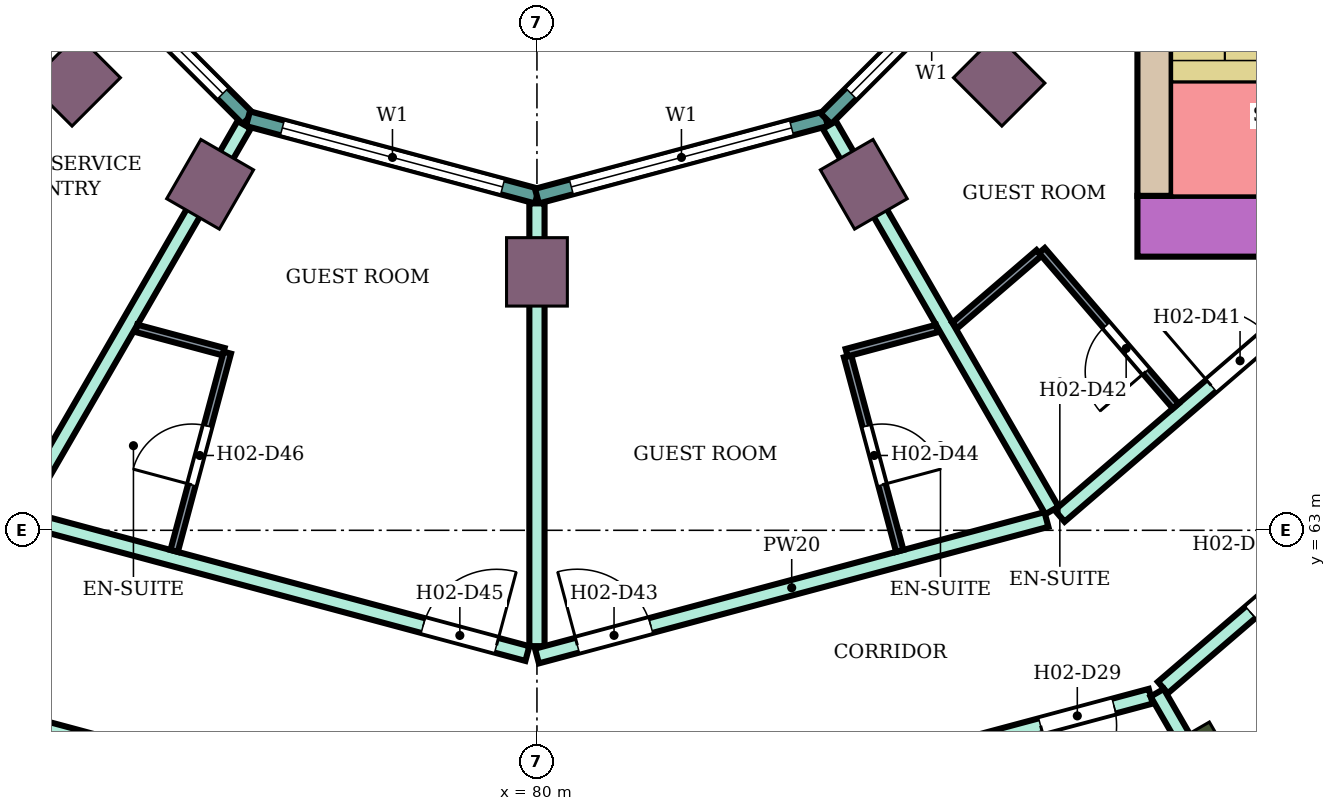
"""IFC4 building model, lengths in metres.
Left out: names, types, materials, properties, quantities, classifications, styles, units other than length and angle.
Written with IfcOpenShell. Run it as: python <this file> out.ifc"""

import sys

from ifc_helpers import new_model, si_unit, direction, frame, frame_2d, origin, origin_2d, place, context, subcontext, project, spatial, rectangle, extrude, element, fill, save


model = new_model("IFC4")
c1 = context("Model", 3, precision=1e-05, world=origin(), true_north=direction((0.0, 1.0)))
c2 = subcontext(c1, "Body", "Model", "MODEL_VIEW")
j1 = project(units=[si_unit("LENGTHUNIT", "METRE"), si_unit("PLANEANGLEUNIT", "RADIAN")], contexts=[c1])
p1 = place(None, origin())
s1 = spatial("IfcSite", under=j1, at=p1, CompositionType="ELEMENT")
p2 = place(p1, origin())
s2 = spatial("IfcBuilding", under=s1, at=p2, CompositionType="ELEMENT")
p3 = place(p2, frame((0.0, 0.0, 44.0)))
s3 = spatial("IfcBuildingStorey", under=s2, at=p3, CompositionType="ELEMENT", Elevation=44.0)
p4 = place(p3, frame((88.8, 59.758, 0.0), z_axis=(0.0, 0.0, 1.0), x_axis=(0.5, -0.866025403784, 0.0)))
e1 = element("IfcColumn", 1, at=p4, inside=s3, PredefinedType="COLUMN", context=c2, shape_type="SweptSolid", body=[
    extrude(rectangle(XDim=1.2, YDim=0.8, at=origin_2d()), origin(), (0.0, 0.0, 1.0), 3.8),
])
for number, where, z_axis, x_axis in (
    (2, (73.919, 68.919, 0.0), (0.0, 0.0, 1.0), (-0.707, -0.707, 0.0)),
    (3, (75.7, 67.552, 0.0), (0.0, 0.0, 1.0), (-0.5, -0.866, 0.0)),
    (4, (80.0, 66.4, 0.0), (0.0, 0.0, 1.0), (0.0, -1.0, 0.0)),
    (5, (84.3, 67.552, 0.0), (0.0, 0.0, 1.0), (0.5, -0.866, 0.0)),
    (6, (86.081, 68.919, 0.0), (0.0, 0.0, 1.0), (0.707, -0.707, 0.0)),
):
    element("IfcColumn", number, at=place(p3, frame(where, z_axis=z_axis, x_axis=x_axis)), inside=s3, PredefinedType="COLUMN", context=c2, shape_type="SweptSolid", body=[
        extrude(rectangle(XDim=0.9, YDim=0.8, at=origin_2d()), origin(), (0.0, 0.0, 1.0), 3.8),
    ])
p5 = place(p3, frame((87.9, 67.0, 0.0), z_axis=(0.0, 0.0, 1.0), x_axis=(1.0, 0.0, 0.0)))
e7 = element("IfcWall", 7, at=p5, inside=s3, PredefinedType="SHEAR", context=c2, shape_type="SweptSolid", body=[
    extrude(rectangle(XDim=14.7, YDim=0.8, at=frame_2d((7.35, 0.0))), origin(), (0.0, 0.0, 1.0), 3.48),
])
p6 = place(p5, frame((4.2, 0.0, 0.0)))
e8 = element("IfcOpeningElement", 8, at=p6, cuts=e7, PredefinedType="OPENING", context=c2, shape_type="SweptSolid", body=[
    extrude(rectangle(XDim=2.4, YDim=2.4, at=frame_2d((1.2, 1.2))), frame((0.0, 0.41, 0.0), z_axis=(0.0, -1.0, 0.0), x_axis=(1.0, 0.0, 0.0)), (0.0, 0.0, 1.0), 0.82),
])
p7 = place(p3, frame((88.125, 67.4, 0.0), z_axis=(0.0, 0.0, 1.0), x_axis=(0.0, 1.0, 0.0)))
e9 = element("IfcWall", 9, at=p7, inside=s3, PredefinedType="SHEAR", context=c2, shape_type="SweptSolid", body=[
    extrude(rectangle(XDim=7.6, YDim=0.45, at=frame_2d((3.8, 0.0))), origin(), (0.0, 0.0, 1.0), 3.48),
])
p8 = place(p3, frame((73.415, 71.198, 0.0), z_axis=(0.0, 0.0, 1.0), x_axis=(0.707106781187, -0.707106781187, 0.0)))
e10 = element("IfcWall", 10, at=p8, inside=s3, PredefinedType="NOTDEFINED", context=c2, shape_type="SweptSolid", body=[
    extrude(rectangle(XDim=3.936, YDim=0.2, at=frame_2d((1.968, 0.0))), origin(), (0.0, 0.0, 1.0), 3.8),
])
p9 = place(p8, frame((0.468, 0.0, 0.9)))
e11 = element("IfcOpeningElement", 11, at=p9, cuts=e10, PredefinedType="OPENING", context=c2, shape_type="SweptSolid", body=[
    extrude(rectangle(XDim=3.0, YDim=2.3, at=frame_2d((1.5, 1.15))), frame((0.0, 0.11, 0.0), z_axis=(0.0, -1.0, 0.0), x_axis=(1.0, 0.0, 0.0)), (0.0, 0.0, 1.0), 0.22),
])
p10 = place(p3, frame((76.198, 68.415, 0.0), z_axis=(0.0, 0.0, 1.0), x_axis=(0.965933654434, -0.258789828301, 0.0)))
e12 = element("IfcWall", 12, at=p10, inside=s3, PredefinedType="NOTDEFINED", context=c2, shape_type="SweptSolid", body=[
    extrude(rectangle(XDim=3.936, YDim=0.2, at=frame_2d((1.968, 0.0))), origin(), (0.0, 0.0, 1.0), 3.8),
])
p11 = place(p10, frame((0.468, 0.0, 0.9)))
e13 = element("IfcOpeningElement", 13, at=p11, cuts=e12, PredefinedType="OPENING", context=c2, shape_type="SweptSolid", body=[
    extrude(rectangle(XDim=3.0, YDim=2.3, at=frame_2d((1.5, 1.15))), frame((0.0, 0.11, 0.0), z_axis=(0.0, -1.0, 0.0), x_axis=(1.0, 0.0, 0.0)), (0.0, 0.0, 1.0), 0.22),
])
p12 = place(p3, frame((80.0, 67.396, 0.0), z_axis=(0.0, 0.0, 1.0), x_axis=(0.965933654434, 0.258789828301, 0.0)))
e14 = element("IfcWall", 14, at=p12, inside=s3, PredefinedType="NOTDEFINED", context=c2, shape_type="SweptSolid", body=[
    extrude(rectangle(XDim=3.936, YDim=0.2, at=frame_2d((1.968, 0.0))), origin(), (0.0, 0.0, 1.0), 3.8),
])
p13 = place(p12, frame((0.468, 0.0, 0.9)))
e15 = element("IfcOpeningElement", 15, at=p13, cuts=e14, PredefinedType="OPENING", context=c2, shape_type="SweptSolid", body=[
    extrude(rectangle(XDim=3.0, YDim=2.3, at=frame_2d((1.5, 1.15))), frame((0.0, 0.11, 0.0), z_axis=(0.0, -1.0, 0.0), x_axis=(1.0, 0.0, 0.0)), (0.0, 0.0, 1.0), 0.22),
])
p14 = place(p3, frame((83.802, 68.415, 0.0), z_axis=(0.0, 0.0, 1.0), x_axis=(0.707106781187, 0.707106781187, 0.0)))
e16 = element("IfcWall", 16, at=p14, inside=s3, PredefinedType="NOTDEFINED", context=c2, shape_type="SweptSolid", body=[
    extrude(rectangle(XDim=3.936, YDim=0.2, at=frame_2d((1.968, 0.0))), origin(), (0.0, 0.0, 1.0), 3.8),
])
p15 = place(p14, frame((0.468, 0.0, 0.9)))
e17 = element("IfcOpeningElement", 17, at=p15, cuts=e16, PredefinedType="OPENING", context=c2, shape_type="SweptSolid", body=[
    extrude(rectangle(XDim=3.0, YDim=2.3, at=frame_2d((1.5, 1.15))), frame((0.0, 0.11, 0.0), z_axis=(0.0, -1.0, 0.0), x_axis=(1.0, 0.0, 0.0)), (0.0, 0.0, 1.0), 0.22),
])
p16 = place(p3, frame((71.877, 60.832, 0.0), z_axis=(0.0, 0.0, 1.0), x_axis=(0.965852509869, -0.259092510851, 0.0)))
e18 = element("IfcWall", 18, at=p16, inside=s3, PredefinedType="PARTITIONING", context=c2, shape_type="SweptSolid", body=[
    extrude(rectangle(XDim=8.32, YDim=0.2, at=frame_2d((4.16, 0.0))), origin(), (0.0, 0.0, 1.0), 3.35),
])
p17 = place(p16, frame((6.86, 0.0, 0.0)))
e19 = element("IfcOpeningElement", 19, at=p17, cuts=e18, PredefinedType="OPENING", context=c2, shape_type="SweptSolid", body=[
    extrude(rectangle(XDim=1.0, YDim=2.1, at=frame_2d((0.5, 1.05))), frame((0.0, 0.11, 0.0), z_axis=(0.0, -1.0, 0.0), x_axis=(1.0, 0.0, 0.0)), (0.0, 0.0, 1.0), 0.22),
])
p18 = place(p16, frame((0.55, 0.0, 0.0)))
e20 = element("IfcOpeningElement", 20, at=p18, cuts=e18, PredefinedType="OPENING", context=c2, shape_type="SweptSolid", body=[
    extrude(rectangle(XDim=1.0, YDim=2.1, at=frame_2d((0.5, 1.05))), frame((0.0, 0.11, 0.0), z_axis=(0.0, -1.0, 0.0), x_axis=(1.0, 0.0, 0.0)), (0.0, 0.0, 1.0), 0.22),
])
p19 = place(p3, frame((73.287, 63.145, 0.0), z_axis=(0.0, 0.0, 1.0), x_axis=(0.965854200194, -0.259086209526, 0.0)))
e21 = element("IfcWall", 21, at=p19, inside=s3, PredefinedType="PARTITIONING", context=c2, shape_type="SweptSolid", body=[
    extrude(rectangle(XDim=6.82, YDim=0.2, at=frame_2d((3.41, 0.0))), origin(), (0.0, 0.0, 1.0), 3.35),
])
p20 = place(p19, frame((5.4, 0.0, 0.0)))
e22 = element("IfcOpeningElement", 22, at=p20, cuts=e21, PredefinedType="OPENING", context=c2, shape_type="SweptSolid", body=[
    extrude(rectangle(XDim=1.0, YDim=2.1, at=frame_2d((0.5, 1.05))), frame((0.0, 0.11, 0.0), z_axis=(0.0, -1.0, 0.0), x_axis=(1.0, 0.0, 0.0)), (0.0, 0.0, 1.0), 0.22),
])
p21 = place(p3, frame((73.169, 63.178, 0.0), z_axis=(0.0, 0.0, 1.0), x_axis=(0.50020860964, 0.865904929448, 0.0)))
e23 = element("IfcWall", 23, at=p21, inside=s3, PredefinedType="PARTITIONING", context=c2, shape_type="SweptSolid", body=[
    extrude(rectangle(XDim=5.955, YDim=0.2, at=frame_2d((2.978, 0.0))), origin(), (0.0, 0.0, 1.0), 3.35),
])
p22 = place(p3, frame((80.0, 58.655, 0.0), z_axis=(0.0, 0.0, 1.0), x_axis=(0.965967338894, 0.258664068224, 0.0)))
e24 = element("IfcWall", 24, at=p22, inside=s3, PredefinedType="PARTITIONING", context=c2, shape_type="SweptSolid", body=[
    extrude(rectangle(XDim=8.36, YDim=0.2, at=frame_2d((4.18, 0.0))), origin(), (0.0, 0.0, 1.0), 3.35),
])
p23 = place(p22, frame((6.86, 0.0, 0.0)))
e25 = element("IfcOpeningElement", 25, at=p23, cuts=e24, PredefinedType="OPENING", context=c2, shape_type="SweptSolid", body=[
    extrude(rectangle(XDim=1.0, YDim=2.1, at=frame_2d((0.5, 1.05))), frame((0.0, 0.11, 0.0), z_axis=(0.0, -1.0, 0.0), x_axis=(1.0, 0.0, 0.0)), (0.0, 0.0, 1.0), 0.22),
])
p24 = place(p22, frame((1.675, 0.0, 0.0)))
e26 = element("IfcOpeningElement", 26, at=p24, cuts=e24, PredefinedType="OPENING", context=c2, shape_type="SweptSolid", body=[
    extrude(rectangle(XDim=0.9, YDim=2.1, at=frame_2d((0.45, 1.05))), frame((0.0, 0.11, 0.0), z_axis=(0.0, -1.0, 0.0), x_axis=(1.0, 0.0, 0.0)), (0.0, 0.0, 1.0), 0.22),
])
p25 = place(p3, frame((80.0, 61.476, 0.0), z_axis=(0.0, 0.0, 1.0), x_axis=(0.0, 1.0, 0.0)))
e27 = element("IfcWall", 27, at=p25, inside=s3, PredefinedType="PARTITIONING", context=c2, shape_type="SweptSolid", body=[
    extrude(rectangle(XDim=5.825, YDim=0.2, at=frame_2d((2.913, 0.0))), origin(), (0.0, 0.0, 1.0), 3.35),
])
p26 = place(p3, frame((80.0, 61.346, 0.0), z_axis=(0.0, 0.0, 1.0), x_axis=(0.965924181808, 0.258825182312, 0.0)))
e28 = element("IfcWall", 28, at=p26, inside=s3, PredefinedType="PARTITIONING", context=c2, shape_type="SweptSolid", body=[
    extrude(rectangle(XDim=6.94, YDim=0.2, at=frame_2d((3.47, 0.0))), origin(), (0.0, 0.0, 1.0), 3.35),
])
p27 = place(p26, frame((0.55, 0.0, 0.0)))
e29 = element("IfcOpeningElement", 29, at=p27, cuts=e28, PredefinedType="OPENING", context=c2, shape_type="SweptSolid", body=[
    extrude(rectangle(XDim=1.0, YDim=2.1, at=frame_2d((0.5, 1.05))), frame((0.0, 0.11, 0.0), z_axis=(0.0, -1.0, 0.0), x_axis=(1.0, 0.0, 0.0)), (0.0, 0.0, 1.0), 0.22),
])
p28 = place(p3, frame((83.848, 68.332, 0.0), z_axis=(0.0, 0.0, 1.0), x_axis=(0.499919778085, -0.866071714975, 0.0)))
e30 = element("IfcWall", 30, at=p28, inside=s3, PredefinedType="PARTITIONING", context=c2, shape_type="SweptSolid", body=[
    extrude(rectangle(XDim=5.855, YDim=0.2, at=frame_2d((2.927, 0.0))), origin(), (0.0, 0.0, 1.0), 3.35),
])
p29 = place(p3, frame((86.877, 63.189, 0.0), z_axis=(0.0, 0.0, 1.0), x_axis=(0.758164888471, 0.652062881853, 0.0)))
e31 = element("IfcWall", 31, at=p29, inside=s3, PredefinedType="PARTITIONING", context=c2, shape_type="SweptSolid", body=[
    extrude(rectangle(XDim=5.23, YDim=0.2, at=frame_2d((2.615, 0.0))), origin(), (0.0, 0.0, 1.0), 3.35),
])
p30 = place(p29, frame((2.63, 0.0, 0.0)))
e32 = element("IfcOpeningElement", 32, at=p30, cuts=e31, PredefinedType="OPENING", context=c2, shape_type="SweptSolid", body=[
    extrude(rectangle(XDim=1.0, YDim=2.1, at=frame_2d((0.5, 1.05))), frame((0.0, 0.11, 0.0), z_axis=(0.0, -1.0, 0.0), x_axis=(1.0, 0.0, 0.0)), (0.0, 0.0, 1.0), 0.22),
])
p31 = place(p3, frame((88.235, 60.931, 0.0), z_axis=(0.0, 0.0, 1.0), x_axis=(0.758799498714, 0.651324282329, 0.0)))
e33 = element("IfcWall", 33, at=p31, inside=s3, PredefinedType="PARTITIONING", context=c2, shape_type="SweptSolid", body=[
    extrude(rectangle(XDim=6.186, YDim=0.2, at=frame_2d((3.093, 0.0))), origin(), (0.0, 0.0, 1.0), 3.35),
])
p32 = place(p31, frame((1.519, 0.0, 0.0)))
e34 = element("IfcOpeningElement", 34, at=p32, cuts=e33, PredefinedType="OPENING", context=c2, shape_type="SweptSolid", body=[
    extrude(rectangle(XDim=1.0, YDim=2.1, at=frame_2d((0.5, 1.05))), frame((0.0, 0.11, 0.0), z_axis=(0.0, -1.0, 0.0), x_axis=(1.0, 0.0, 0.0)), (0.0, 0.0, 1.0), 0.22),
])
p33 = place(p3, frame((88.159, 60.863, 0.0), z_axis=(0.0, 0.0, 1.0), x_axis=(0.499897184548, -0.866084756177, 0.0)))
e35 = element("IfcWall", 35, at=p33, inside=s3, PredefinedType="PARTITIONING", context=c2, shape_type="SweptSolid", body=[
    extrude(rectangle(XDim=9.475, YDim=0.2, at=frame_2d((4.737, 0.0))), origin(), (0.0, 0.0, 1.0), 3.35),
])
p34 = place(p3, frame((74.729, 65.657, 0.0), z_axis=(0.0, 0.0, 1.0), x_axis=(0.965948051503, -0.258736085224, 0.0)))
e36 = element("IfcWall", 36, at=p34, inside=s3, PredefinedType="PARTITIONING", context=c2, shape_type="SweptSolid", body=[
    extrude(rectangle(XDim=1.189, YDim=0.1, at=frame_2d((0.594, 0.0))), origin(), (0.0, 0.0, 1.0), 3.35),
])
p35 = place(p3, frame((75.227, 62.729, 0.0), z_axis=(0.0, 0.0, 1.0), x_axis=(0.258945475746, 0.965891940432, 0.0)))
e37 = element("IfcWall", 37, at=p35, inside=s3, PredefinedType="PARTITIONING", context=c2, shape_type="SweptSolid", body=[
    extrude(rectangle(XDim=2.7, YDim=0.1, at=frame_2d((1.35, 0.0))), origin(), (0.0, 0.0, 1.0), 3.35),
])
p36 = place(p35, frame((0.9, 0.0, 0.0)))
e38 = element("IfcOpeningElement", 38, at=p36, cuts=e37, PredefinedType="OPENING", context=c2, shape_type="SweptSolid", body=[
    extrude(rectangle(XDim=0.8, YDim=2.1, at=frame_2d((0.4, 1.05))), frame((0.0, 0.06, 0.0), z_axis=(0.0, -1.0, 0.0), x_axis=(1.0, 0.0, 0.0)), (0.0, 0.0, 1.0), 0.12),
])
p37 = place(p3, frame((84.087, 65.289, 0.0), z_axis=(0.0, 0.0, 1.0), x_axis=(0.258929459649, -0.965896234037, 0.0)))
e39 = element("IfcWall", 39, at=p37, inside=s3, PredefinedType="PARTITIONING", context=c2, shape_type="SweptSolid", body=[
    extrude(rectangle(XDim=2.65, YDim=0.1, at=frame_2d((1.325, 0.0))), origin(), (0.0, 0.0, 1.0), 3.35),
])
p38 = place(p37, frame((0.95, 0.0, 0.0)))
e40 = element("IfcOpeningElement", 40, at=p38, cuts=e39, PredefinedType="OPENING", context=c2, shape_type="SweptSolid", body=[
    extrude(rectangle(XDim=0.8, YDim=2.1, at=frame_2d((0.4, 1.05))), frame((0.0, 0.06, 0.0), z_axis=(0.0, -1.0, 0.0), x_axis=(1.0, 0.0, 0.0)), (0.0, 0.0, 1.0), 0.12),
])
p39 = place(p3, frame((84.074, 65.337, 0.0), z_axis=(0.0, 0.0, 1.0), x_axis=(0.965914351064, 0.258861867428, 0.0)))
e41 = element("IfcWall", 41, at=p39, inside=s3, PredefinedType="PARTITIONING", context=c2, shape_type="SweptSolid", body=[
    extrude(rectangle(XDim=1.229, YDim=0.1, at=frame_2d((0.615, 0.0))), origin(), (0.0, 0.0, 1.0), 3.35),
])
p40 = place(p3, frame((85.497, 65.696, 0.0), z_axis=(0.0, 0.0, 1.0), x_axis=(0.75817032582, 0.652056559698, 0.0)))
e42 = element("IfcWall", 42, at=p40, inside=s3, PredefinedType="PARTITIONING", context=c2, shape_type="SweptSolid", body=[
    extrude(rectangle(XDim=1.461, YDim=0.1, at=frame_2d((0.73, 0.0))), origin(), (0.0, 0.0, 1.0), 3.35),
])
p41 = place(p3, frame((86.643, 66.681, 0.0), z_axis=(0.0, 0.0, 1.0), x_axis=(0.652264876065, -0.757991115682, 0.0)))
e43 = element("IfcWall", 43, at=p41, inside=s3, PredefinedType="PARTITIONING", context=c2, shape_type="SweptSolid", body=[
    extrude(rectangle(XDim=2.699, YDim=0.1, at=frame_2d((1.35, 0.0))), origin(), (0.0, 0.0, 1.0), 3.35),
])
p42 = place(p41, frame((1.3, 0.0, 0.0)))
e44 = element("IfcOpeningElement", 44, at=p42, cuts=e43, PredefinedType="OPENING", context=c2, shape_type="SweptSolid", body=[
    extrude(rectangle(XDim=0.8, YDim=2.1, at=frame_2d((0.4, 1.05))), frame((0.0, 0.06, 0.0), z_axis=(0.0, -1.0, 0.0), x_axis=(1.0, 0.0, 0.0)), (0.0, 0.0, 1.0), 0.12),
])
p43 = place(p9, origin())
e45 = element("IfcWindow", 45, at=p43, inside=s3, PartitioningType="SINGLE_PANEL", PredefinedType="WINDOW", context=c2, shape_type="SweptSolid", body=[
    extrude(rectangle(XDim=3.0, YDim=2.3, at=frame_2d((1.5, 1.15))), frame((0.0, 0.03, 0.0), z_axis=(0.0, -1.0, 0.0), x_axis=(1.0, 0.0, 0.0)), (0.0, 0.0, 1.0), 0.06),
])
fill(e11, e45)
p44 = place(p11, origin())
e46 = element("IfcWindow", 46, at=p44, inside=s3, PartitioningType="SINGLE_PANEL", PredefinedType="WINDOW", context=c2, shape_type="SweptSolid", body=[
    extrude(rectangle(XDim=3.0, YDim=2.3, at=frame_2d((1.5, 1.15))), frame((0.0, 0.03, 0.0), z_axis=(0.0, -1.0, 0.0), x_axis=(1.0, 0.0, 0.0)), (0.0, 0.0, 1.0), 0.06),
])
fill(e13, e46)
p45 = place(p13, origin())
e47 = element("IfcWindow", 47, at=p45, inside=s3, PartitioningType="SINGLE_PANEL", PredefinedType="WINDOW", context=c2, shape_type="SweptSolid", body=[
    extrude(rectangle(XDim=3.0, YDim=2.3, at=frame_2d((1.5, 1.15))), frame((0.0, 0.03, 0.0), z_axis=(0.0, -1.0, 0.0), x_axis=(1.0, 0.0, 0.0)), (0.0, 0.0, 1.0), 0.06),
])
fill(e15, e47)
p46 = place(p15, origin())
e48 = element("IfcWindow", 48, at=p46, inside=s3, PartitioningType="SINGLE_PANEL", PredefinedType="WINDOW", context=c2, shape_type="SweptSolid", body=[
    extrude(rectangle(XDim=3.0, YDim=2.3, at=frame_2d((1.5, 1.15))), frame((0.0, 0.03, 0.0), z_axis=(0.0, -1.0, 0.0), x_axis=(1.0, 0.0, 0.0)), (0.0, 0.0, 1.0), 0.06),
])
fill(e17, e48)
p47 = place(p32, frame((1.0, 0.0, 0.0), z_axis=(0.0, 0.0, 1.0), x_axis=(-1.0, 0.0, 0.0)))
e49 = element("IfcDoor", 49, at=p47, inside=s3, OperationType="SINGLE_SWING_LEFT", PredefinedType="DOOR", context=c2, shape_type="SweptSolid", body=[
    extrude(rectangle(XDim=1.0, YDim=2.1, at=frame_2d((0.5, 1.05))), frame((0.0, 0.025, 0.0), z_axis=(0.0, -1.0, 0.0), x_axis=(1.0, 0.0, 0.0)), (0.0, 0.0, 1.0), 0.05),
])
fill(e34, e49)
p48 = place(p23, frame((1.0, 0.0, 0.0), z_axis=(0.0, 0.0, 1.0), x_axis=(-1.0, 0.0, 0.0)))
e50 = element("IfcDoor", 50, at=p48, inside=s3, OperationType="SINGLE_SWING_RIGHT", PredefinedType="DOOR", context=c2, shape_type="SweptSolid", body=[
    extrude(rectangle(XDim=1.0, YDim=2.1, at=frame_2d((0.5, 1.05))), frame((0.0, 0.025, 0.0), z_axis=(0.0, -1.0, 0.0), x_axis=(1.0, 0.0, 0.0)), (0.0, 0.0, 1.0), 0.05),
])
fill(e25, e50)
p49 = place(p30, origin())
e51 = element("IfcDoor", 51, at=p49, inside=s3, OperationType="SINGLE_SWING_LEFT", PredefinedType="DOOR", context=c2, shape_type="SweptSolid", body=[
    extrude(rectangle(XDim=1.0, YDim=2.1, at=frame_2d((0.5, 1.05))), frame((0.0, 0.025, 0.0), z_axis=(0.0, -1.0, 0.0), x_axis=(1.0, 0.0, 0.0)), (0.0, 0.0, 1.0), 0.05),
])
fill(e32, e51)
p50 = place(p42, frame((0.8, 0.0, 0.0), z_axis=(0.0, 0.0, 1.0), x_axis=(-1.0, 0.0, 0.0)))
e52 = element("IfcDoor", 52, at=p50, inside=s3, OperationType="SINGLE_SWING_LEFT", PredefinedType="DOOR", context=c2, shape_type="SweptSolid", body=[
    extrude(rectangle(XDim=0.8, YDim=2.1, at=frame_2d((0.4, 1.05))), frame((0.0, 0.025, 0.0), z_axis=(0.0, -1.0, 0.0), x_axis=(1.0, 0.0, 0.0)), (0.0, 0.0, 1.0), 0.05),
])
fill(e44, e52)
p51 = place(p27, origin())
e53 = element("IfcDoor", 53, at=p51, inside=s3, OperationType="SINGLE_SWING_LEFT", PredefinedType="DOOR", context=c2, shape_type="SweptSolid", body=[
    extrude(rectangle(XDim=1.0, YDim=2.1, at=frame_2d((0.5, 1.05))), frame((0.0, 0.025, 0.0), z_axis=(0.0, -1.0, 0.0), x_axis=(1.0, 0.0, 0.0)), (0.0, 0.0, 1.0), 0.05),
])
fill(e29, e53)
p52 = place(p38, origin())
e54 = element("IfcDoor", 54, at=p52, inside=s3, OperationType="SINGLE_SWING_RIGHT", PredefinedType="DOOR", context=c2, shape_type="SweptSolid", body=[
    extrude(rectangle(XDim=0.8, YDim=2.1, at=frame_2d((0.4, 1.05))), frame((0.0, 0.025, 0.0), z_axis=(0.0, -1.0, 0.0), x_axis=(1.0, 0.0, 0.0)), (0.0, 0.0, 1.0), 0.05),
])
fill(e40, e54)
p53 = place(p20, origin())
e55 = element("IfcDoor", 55, at=p53, inside=s3, OperationType="SINGLE_SWING_RIGHT", PredefinedType="DOOR", context=c2, shape_type="SweptSolid", body=[
    extrude(rectangle(XDim=1.0, YDim=2.1, at=frame_2d((0.5, 1.05))), frame((0.0, 0.025, 0.0), z_axis=(0.0, -1.0, 0.0), x_axis=(1.0, 0.0, 0.0)), (0.0, 0.0, 1.0), 0.05),
])
fill(e22, e55)
p54 = place(p36, origin())
e56 = element("IfcDoor", 56, at=p54, inside=s3, OperationType="SINGLE_SWING_LEFT", PredefinedType="DOOR", context=c2, shape_type="SweptSolid", body=[
    extrude(rectangle(XDim=0.8, YDim=2.1, at=frame_2d((0.4, 1.05))), frame((0.0, 0.025, 0.0), z_axis=(0.0, -1.0, 0.0), x_axis=(1.0, 0.0, 0.0)), (0.0, 0.0, 1.0), 0.05),
])
fill(e38, e56)
save(model, sys.argv[1])
